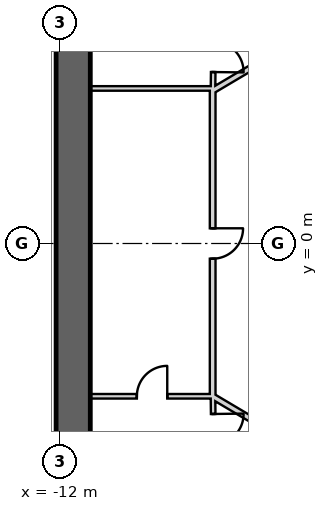
"""IFC4 building model, lengths in metres.
Left out: names, types, materials, properties, quantities, classifications, styles, units other than length and angle.
Written with IfcOpenShell. Run it as: python <this file> out.ifc"""

import sys

from ifc_helpers import new_model, si_unit, direction, frame, frame_2d, origin, place, context, subcontext, project, spatial, rectangle, extrude, element, fill, save


model = new_model("IFC4")
c1 = context("Model", 3, precision=1e-05, world=origin(), true_north=direction((0.0, 1.0)))
c2 = subcontext(c1, "Body", "Model", "MODEL_VIEW")
j1 = project(units=[si_unit("LENGTHUNIT", "METRE"), si_unit("PLANEANGLEUNIT", "RADIAN")], contexts=[c1])
p1 = place(None, origin())
s1 = spatial("IfcSite", under=j1, at=p1, CompositionType="ELEMENT")
p2 = place(p1, origin())
s2 = spatial("IfcBuilding", under=s1, at=p2, CompositionType="ELEMENT")
p3 = place(p2, frame((0.0, 0.0, 404.8)))
s3 = spatial("IfcBuildingStorey", under=s2, at=p3, CompositionType="ELEMENT", Elevation=404.8)
p4 = place(p3, frame((19.475, 2.208, 0.0), z_axis=(0.0, 0.0, 1.0), x_axis=(-0.866028369851, 0.499994862586, 0.0)))
e1 = element("IfcWall", 1, at=p4, inside=s3, PredefinedType="SHEAR", context=c2, shape_type="SweptSolid", body=[
    extrude(rectangle(XDim=31.523, YDim=0.9, at=frame_2d((15.762, 0.0))), origin(), (0.0, 0.0, 1.0), 5.5),
])
p5 = place(p4, frame((3.612, 0.0, 0.0)))
e2 = element("IfcOpeningElement", 2, at=p5, cuts=e1, PredefinedType="OPENING", context=c2, shape_type="SweptSolid", body=[
    extrude(rectangle(XDim=1.2, YDim=2.4, at=frame_2d((0.6, 1.2))), frame((0.0, 0.46, 0.0), z_axis=(0.0, -1.0, 0.0), x_axis=(1.0, 0.0, 0.0)), (0.0, 0.0, 1.0), 0.92),
])
p6 = place(p4, frame((26.712, 0.0, 0.0)))
e3 = element("IfcOpeningElement", 3, at=p6, cuts=e1, PredefinedType="OPENING", context=c2, shape_type="SweptSolid", body=[
    extrude(rectangle(XDim=1.2, YDim=2.4, at=frame_2d((0.6, 1.2))), frame((0.0, 0.46, 0.0), z_axis=(0.0, -1.0, 0.0), x_axis=(1.0, 0.0, 0.0)), (0.0, 0.0, 1.0), 0.92),
])
p7 = place(p3, frame((-11.65, 15.762, 0.0), z_axis=(0.0, 0.0, 1.0), x_axis=(0.0, -1.0, 0.0)))
e4 = element("IfcWall", 4, at=p7, inside=s3, PredefinedType="SHEAR", context=c2, shape_type="SweptSolid", body=[
    extrude(rectangle(XDim=31.523, YDim=0.9, at=frame_2d((15.762, 0.0))), origin(), (0.0, 0.0, 1.0), 5.5),
])
p8 = place(p7, frame((3.612, 0.0, 0.0)))
e5 = element("IfcOpeningElement", 5, at=p8, cuts=e4, PredefinedType="OPENING", context=c2, shape_type="SweptSolid", body=[
    extrude(rectangle(XDim=1.2, YDim=2.4, at=frame_2d((0.6, 1.2))), frame((0.0, 0.46, 0.0), z_axis=(0.0, -1.0, 0.0), x_axis=(1.0, 0.0, 0.0)), (0.0, 0.0, 1.0), 0.92),
])
p9 = place(p7, frame((26.712, 0.0, 0.0)))
e6 = element("IfcOpeningElement", 6, at=p9, cuts=e4, PredefinedType="OPENING", context=c2, shape_type="SweptSolid", body=[
    extrude(rectangle(XDim=1.2, YDim=2.4, at=frame_2d((0.6, 1.2))), frame((0.0, 0.46, 0.0), z_axis=(0.0, -1.0, 0.0), x_axis=(1.0, 0.0, 0.0)), (0.0, 0.0, 1.0), 0.92),
])
p10 = place(p3, frame((-7.825, -17.97, 0.0), z_axis=(0.0, 0.0, 1.0), x_axis=(0.866028369851, 0.499994862586, 0.0)))
e7 = element("IfcWall", 7, at=p10, inside=s3, PredefinedType="SHEAR", context=c2, shape_type="SweptSolid", body=[
    extrude(rectangle(XDim=31.523, YDim=0.9, at=frame_2d((15.762, 0.0))), origin(), (0.0, 0.0, 1.0), 5.5),
])
p11 = place(p10, frame((7.062, 0.0, 0.0)))
e8 = element("IfcOpeningElement", 8, at=p11, cuts=e7, PredefinedType="OPENING", context=c2, shape_type="SweptSolid", body=[
    extrude(rectangle(XDim=1.2, YDim=2.4, at=frame_2d((0.6, 1.2))), frame((0.0, 0.46, 0.0), z_axis=(0.0, -1.0, 0.0), x_axis=(1.0, 0.0, 0.0)), (0.0, 0.0, 1.0), 0.92),
])
p12 = place(p10, frame((9.762, 0.0, 0.0)))
e9 = element("IfcOpeningElement", 9, at=p12, cuts=e7, PredefinedType="OPENING", context=c2, shape_type="SweptSolid", body=[
    extrude(rectangle(XDim=1.2, YDim=2.4, at=frame_2d((0.6, 1.2))), frame((0.0, 0.46, 0.0), z_axis=(0.0, -1.0, 0.0), x_axis=(1.0, 0.0, 0.0)), (0.0, 0.0, 1.0), 0.92),
])
p13 = place(p10, frame((17.862, 0.0, 0.0)))
e10 = element("IfcOpeningElement", 10, at=p13, cuts=e7, PredefinedType="OPENING", context=c2, shape_type="SweptSolid", body=[
    extrude(rectangle(XDim=1.2, YDim=2.4, at=frame_2d((0.6, 1.2))), frame((0.0, 0.46, 0.0), z_axis=(0.0, -1.0, 0.0), x_axis=(1.0, 0.0, 0.0)), (0.0, 0.0, 1.0), 0.92),
])
p14 = place(p10, frame((20.562, 0.0, 0.0)))
e11 = element("IfcOpeningElement", 11, at=p14, cuts=e7, PredefinedType="OPENING", context=c2, shape_type="SweptSolid", body=[
    extrude(rectangle(XDim=1.2, YDim=2.4, at=frame_2d((0.6, 1.2))), frame((0.0, 0.46, 0.0), z_axis=(0.0, -1.0, 0.0), x_axis=(1.0, 0.0, 0.0)), (0.0, 0.0, 1.0), 0.92),
])
p15 = place(p10, frame((26.712, 0.0, 0.0)))
e12 = element("IfcOpeningElement", 12, at=p15, cuts=e7, PredefinedType="OPENING", context=c2, shape_type="SweptSolid", body=[
    extrude(rectangle(XDim=1.2, YDim=2.4, at=frame_2d((0.6, 1.2))), frame((0.0, 0.46, 0.0), z_axis=(0.0, -1.0, 0.0), x_axis=(1.0, 0.0, 0.0)), (0.0, 0.0, 1.0), 0.92),
])
p16 = place(p10, frame((3.612, 0.0, 0.0)))
e13 = element("IfcOpeningElement", 13, at=p16, cuts=e7, PredefinedType="OPENING", context=c2, shape_type="SweptSolid", body=[
    extrude(rectangle(XDim=1.2, YDim=2.4, at=frame_2d((0.6, 1.2))), frame((0.0, 0.46, 0.0), z_axis=(0.0, -1.0, 0.0), x_axis=(1.0, 0.0, 0.0)), (0.0, 0.0, 1.0), 0.92),
])
p17 = place(p3, frame((-7.95, 4.08, 0.0), z_axis=(0.0, 0.0, 1.0), x_axis=(-1.0, 0.0, 0.0)))
e14 = element("IfcWall", 14, at=p17, inside=s3, PredefinedType="PARTITIONING", context=c2, shape_type="SweptSolid", body=[
    extrude(rectangle(XDim=3.25, YDim=0.12, at=frame_2d((1.625, 0.0))), origin(), (0.0, 0.0, 1.0), 5.25),
])
p18 = place(p3, frame((-7.971, 4.05, 0.0), z_axis=(0.0, 0.0, 1.0), x_axis=(0.012047318415, 0.999927428426, 0.0)))
e15 = element("IfcWall", 15, at=p18, inside=s3, PredefinedType="PARTITIONING", context=c2, shape_type="SweptSolid", body=[
    extrude(rectangle(XDim=1.723, YDim=0.12, at=frame_2d((0.861, 0.0))), origin(), (0.0, 0.0, 1.0), 5.25),
])
p19 = place(p18, frame((0.461, 0.0, 0.0)))
e16 = element("IfcOpeningElement", 16, at=p19, cuts=e15, PredefinedType="OPENING", context=c2, shape_type="SweptSolid", body=[
    extrude(rectangle(XDim=0.8, YDim=2.1, at=frame_2d((0.4, 1.05))), frame((0.0, 0.07, 0.0), z_axis=(0.0, -1.0, 0.0), x_axis=(1.0, 0.0, 0.0)), (0.0, 0.0, 1.0), 0.14),
])
p20 = place(p3, frame((-11.2, -4.02, 0.0), z_axis=(0.0, 0.0, 1.0), x_axis=(1.0, 0.0, 0.0)))
e17 = element("IfcWall", 17, at=p20, inside=s3, PredefinedType="PARTITIONING", context=c2, shape_type="SweptSolid", body=[
    extrude(rectangle(XDim=3.25, YDim=0.12, at=frame_2d((1.625, 0.0))), origin(), (0.0, 0.0, 1.0), 5.25),
])
p21 = place(p20, frame((1.225, 0.0, 0.0)))
e18 = element("IfcOpeningElement", 18, at=p21, cuts=e17, PredefinedType="OPENING", context=c2, shape_type="SweptSolid", body=[
    extrude(rectangle(XDim=0.8, YDim=2.1, at=frame_2d((0.4, 1.05))), frame((0.0, 0.07, 0.0), z_axis=(0.0, -1.0, 0.0), x_axis=(1.0, 0.0, 0.0)), (0.0, 0.0, 1.0), 0.14),
])
p22 = place(p3, frame((-7.98, 4.05, 0.0), z_axis=(0.0, 0.0, 1.0), x_axis=(0.0, -1.0, 0.0)))
e19 = element("IfcWall", 19, at=p22, inside=s3, PredefinedType="PLUMBINGWALL", context=c2, shape_type="SweptSolid", body=[
    extrude(rectangle(XDim=8.1, YDim=0.15, at=frame_2d((4.05, 0.0))), origin(), (0.0, 0.0, 1.0), 5.25),
])
p23 = place(p22, frame((3.65, 0.0, 0.0)))
e20 = element("IfcOpeningElement", 20, at=p23, cuts=e19, PredefinedType="OPENING", context=c2, shape_type="SweptSolid", body=[
    extrude(rectangle(XDim=0.8, YDim=2.1, at=frame_2d((0.4, 1.05))), frame((0.0, 0.085, 0.0), z_axis=(0.0, -1.0, 0.0), x_axis=(1.0, 0.0, 0.0)), (0.0, 0.0, 1.0), 0.17),
])
p24 = place(p3, frame((-7.951, -5.721, 0.0), z_axis=(0.0, 0.0, 1.0), x_axis=(-0.011976938133, 0.999928273904, 0.0)))
e21 = element("IfcWall", 21, at=p24, inside=s3, PredefinedType="PARTITIONING", context=c2, shape_type="SweptSolid", body=[
    extrude(rectangle(XDim=1.671, YDim=0.12, at=frame_2d((0.836, 0.0))), origin(), (0.0, 0.0, 1.0), 5.25),
])
p25 = place(p24, frame((0.436, 0.0, 0.0)))
e22 = element("IfcOpeningElement", 22, at=p25, cuts=e21, PredefinedType="OPENING", context=c2, shape_type="SweptSolid", body=[
    extrude(rectangle(XDim=0.8, YDim=2.1, at=frame_2d((0.4, 1.05))), frame((0.0, 0.07, 0.0), z_axis=(0.0, -1.0, 0.0), x_axis=(1.0, 0.0, 0.0)), (0.0, 0.0, 1.0), 0.14),
])
p26 = place(p3, frame((-7.95, -4.041, 0.0), z_axis=(0.0, 0.0, 1.0), x_axis=(0.860090281069, -0.510141851263, 0.0)))
e23 = element("IfcWall", 23, at=p26, inside=s3, PredefinedType="PLUMBINGWALL", context=c2, shape_type="SweptSolid", body=[
    extrude(rectangle(XDim=2.089, YDim=0.15, at=frame_2d((1.045, 0.0))), origin(), (0.0, 0.0, 1.0), 5.25),
])
p27 = place(p3, frame((-6.024, 5.183, 0.0), z_axis=(0.0, 0.0, 1.0), x_axis=(-0.860126804455, -0.510080268447, 0.0)))
e24 = element("IfcWall", 24, at=p27, inside=s3, PredefinedType="PLUMBINGWALL", context=c2, shape_type="SweptSolid", body=[
    extrude(rectangle(XDim=2.24, YDim=0.15, at=frame_2d((1.12, 0.0))), origin(), (0.0, 0.0, 1.0), 5.25),
])
p28 = place(p19, origin())
e25 = element("IfcDoor", 25, at=p28, inside=s3, OperationType="SINGLE_SWING_LEFT", PredefinedType="USERDEFINED", context=c2, shape_type="SweptSolid", body=[
    extrude(rectangle(XDim=0.8, YDim=2.1, at=frame_2d((0.4, 1.05))), frame((0.0, 0.025, 0.0), z_axis=(0.0, -1.0, 0.0), x_axis=(1.0, 0.0, 0.0)), (0.0, 0.0, 1.0), 0.05),
])
fill(e16, e25)
p29 = place(p21, origin())
e26 = element("IfcDoor", 26, at=p29, inside=s3, OperationType="SINGLE_SWING_RIGHT", PredefinedType="USERDEFINED", context=c2, shape_type="SweptSolid", body=[
    extrude(rectangle(XDim=0.8, YDim=2.1, at=frame_2d((0.4, 1.05))), frame((0.0, 0.025, 0.0), z_axis=(0.0, -1.0, 0.0), x_axis=(1.0, 0.0, 0.0)), (0.0, 0.0, 1.0), 0.05),
])
fill(e18, e26)
p30 = place(p25, origin())
e27 = element("IfcDoor", 27, at=p30, inside=s3, OperationType="SINGLE_SWING_RIGHT", PredefinedType="USERDEFINED", context=c2, shape_type="SweptSolid", body=[
    extrude(rectangle(XDim=0.8, YDim=2.1, at=frame_2d((0.4, 1.05))), frame((0.0, 0.025, 0.0), z_axis=(0.0, -1.0, 0.0), x_axis=(1.0, 0.0, 0.0)), (0.0, 0.0, 1.0), 0.05),
])
fill(e22, e27)
p31 = place(p23, origin())
e28 = element("IfcDoor", 28, at=p31, inside=s3, OperationType="SINGLE_SWING_LEFT", PredefinedType="USERDEFINED", context=c2, shape_type="SweptSolid", body=[
    extrude(rectangle(XDim=0.8, YDim=2.1, at=frame_2d((0.4, 1.05))), frame((0.0, 0.025, 0.0), z_axis=(0.0, -1.0, 0.0), x_axis=(1.0, 0.0, 0.0)), (0.0, 0.0, 1.0), 0.05),
])
fill(e20, e28)
save(model, sys.argv[1])
